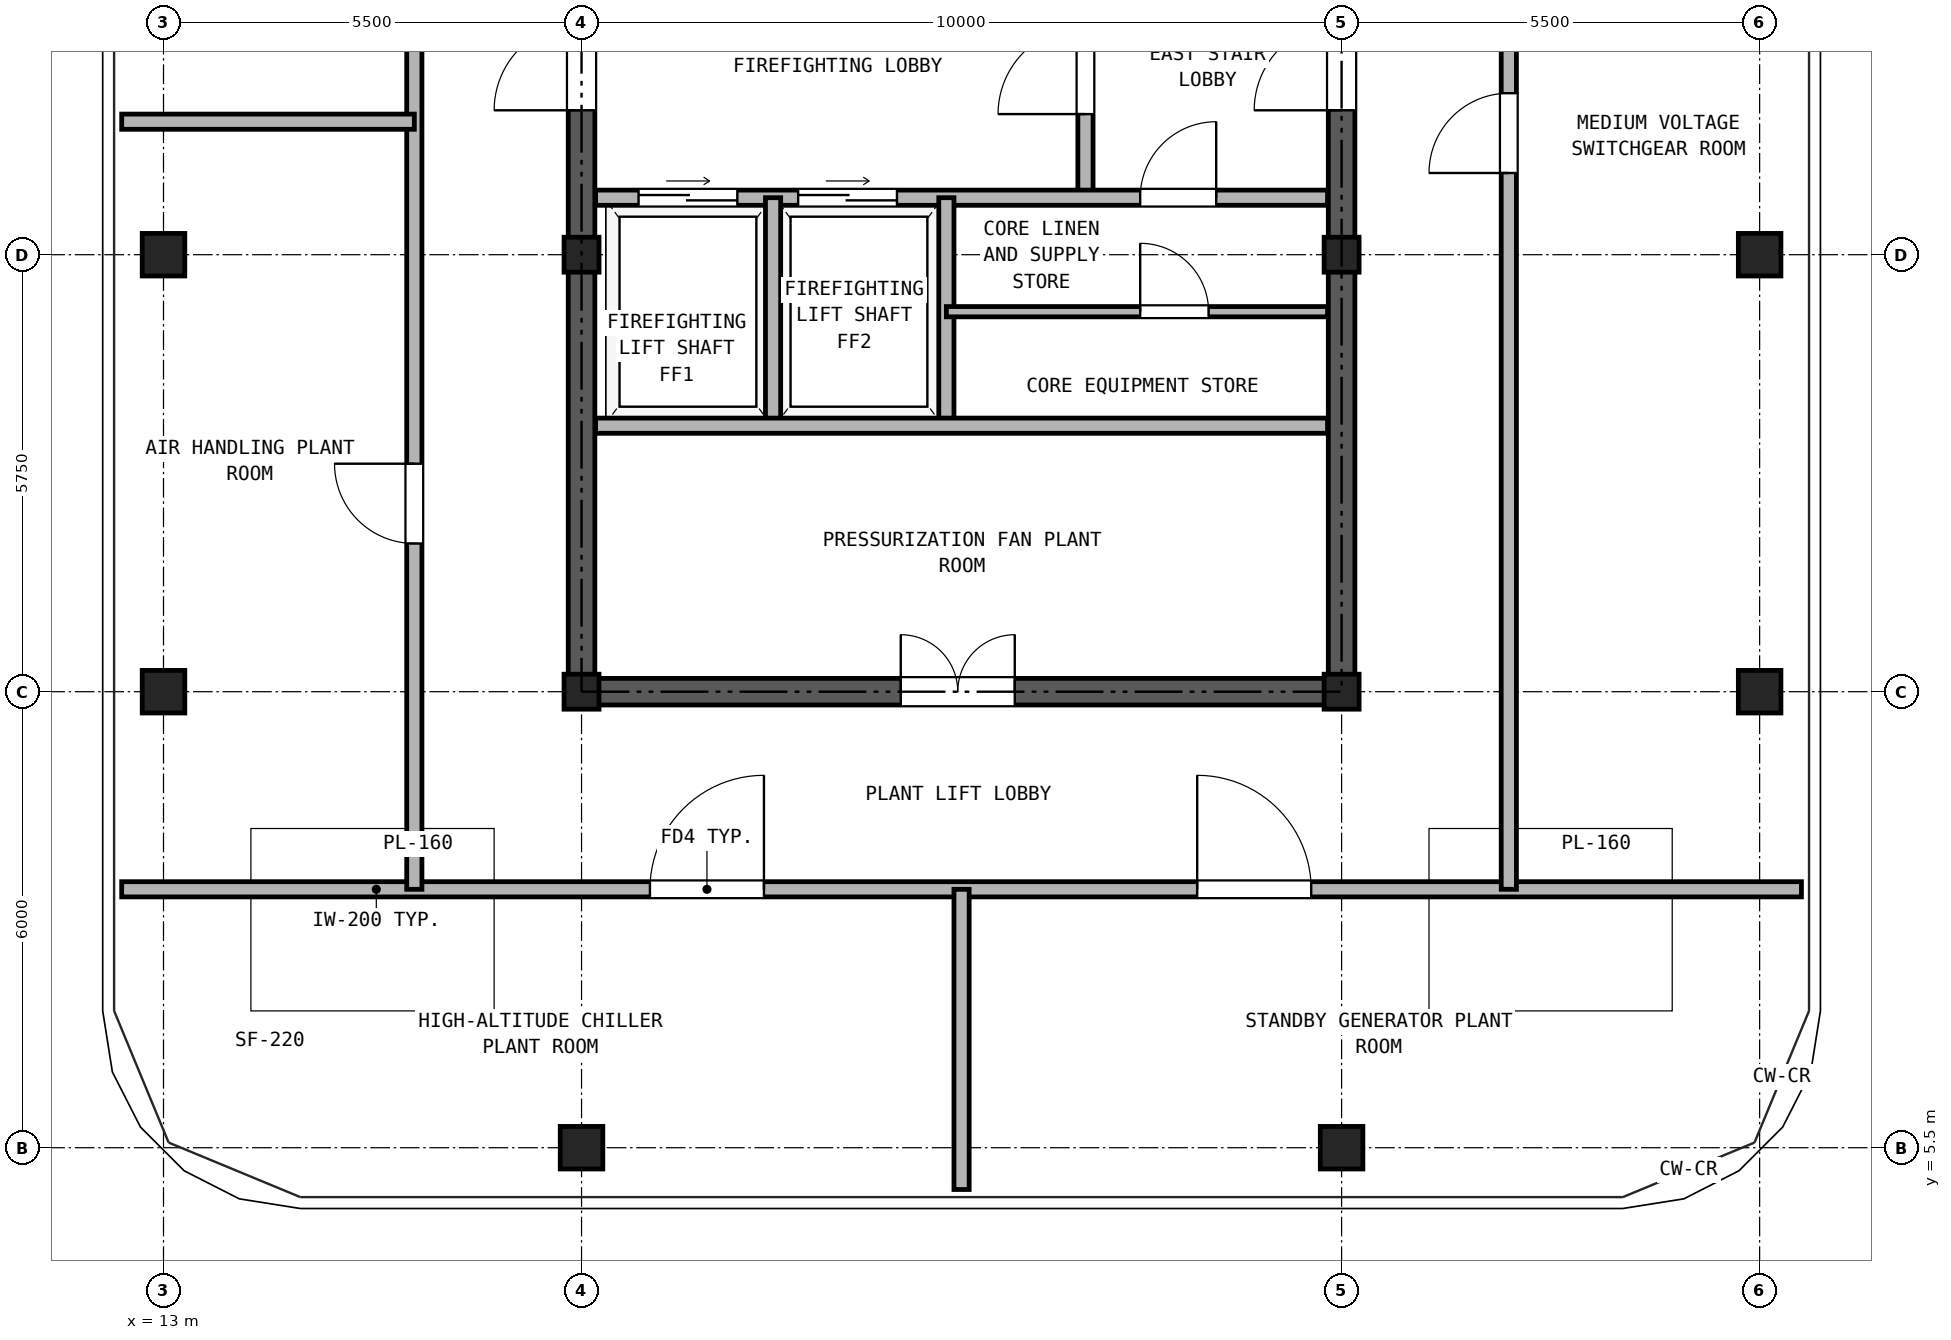
"""IFC4 building model, lengths in metres.
Left out: names, types, materials, properties, quantities, classifications, styles, units other than length and angle.
Written with IfcOpenShell. Run it as: python <this file> out.ifc"""

import sys

from ifc_helpers import new_model, si_unit, direction, frame, frame_2d, origin, origin_2d, place, context, subcontext, project, spatial, rectangle, hollow_rectangle, extrude, source, transform, mapped, element, fill, save


model = new_model("IFC4")
c1 = context("Model", 3, precision=1e-05, world=origin(), true_north=direction((0.0, 1.0)))
c2 = subcontext(c1, "Body", "Model", "MODEL_VIEW")
j1 = project(units=[si_unit("LENGTHUNIT", "METRE"), si_unit("PLANEANGLEUNIT", "RADIAN")], contexts=[c1])
p1 = place(None, origin())
s1 = spatial("IfcSite", under=j1, at=p1, CompositionType="ELEMENT")
p2 = place(p1, origin())
s2 = spatial("IfcBuilding", under=s1, at=p2, CompositionType="ELEMENT")
p3 = place(p2, frame((0.0, 0.0, 292.9)))
s3 = spatial("IfcBuildingStorey", under=s2, at=p3, CompositionType="ELEMENT", Elevation=292.9)
m1 = source(origin(), c2, "Body", "SweptSolid", [
    extrude(hollow_rectangle(XDim=0.56, YDim=0.56, WallThickness=0.03, at=origin_2d()), origin(), (0.0, 0.0, 1.0), 3.312),
])
for number, where, z_axis, x_axis in (
    (1, (18.5, 5.5, 0.0), (0.0, 0.0, 1.0), (1.0, 0.0, 0.0)),
    (2, (28.5, 5.5, 0.0), (0.0, 0.0, 1.0), (1.0, 0.0, 0.0)),
    (3, (13.0, 11.5, 0.0), (0.0, 0.0, 1.0), (1.0, 0.0, 0.0)),
    (4, (34.0, 11.5, 0.0), (0.0, 0.0, 1.0), (1.0, 0.0, 0.0)),
    (5, (13.0, 17.25, 0.0), (0.0, 0.0, 1.0), (1.0, 0.0, 0.0)),
    (6, (34.0, 17.25, 0.0), (0.0, 0.0, 1.0), (1.0, 0.0, 0.0)),
):
    element("IfcColumn", number, at=place(p3, frame(where, z_axis=z_axis, x_axis=x_axis)), inside=s3, PredefinedType="COLUMN", context=c2, shape_type="MappedRepresentation", body=[
        mapped(m1, transform((0.0, 0.0, 0.0), x_axis=(1.0, 0.0, 0.0), y_axis=(0.0, 1.0, 0.0), z_axis=(0.0, 0.0, 1.0), scale=1.0)),
    ])
m2 = source(origin(), c2, "Body", "SweptSolid", [
    extrude(hollow_rectangle(XDim=0.46, YDim=0.46, WallThickness=0.025, at=origin_2d()), origin(), (0.0, 0.0, 1.0), 3.312),
])
for number, where, z_axis, x_axis in (
    (7, (18.5, 11.5, 0.0), (0.0, 0.0, 1.0), (1.0, 0.0, 0.0)),
    (8, (18.5, 17.25, 0.0), (0.0, 0.0, 1.0), (1.0, 0.0, 0.0)),
    (9, (28.5, 11.5, 0.0), (0.0, 0.0, 1.0), (1.0, 0.0, 0.0)),
    (10, (28.5, 17.25, 0.0), (0.0, 0.0, 1.0), (1.0, 0.0, 0.0)),
):
    element("IfcColumn", number, at=place(p3, frame(where, z_axis=z_axis, x_axis=x_axis)), inside=s3, PredefinedType="COLUMN", context=c2, shape_type="MappedRepresentation", body=[
        mapped(m2, transform((0.0, 0.0, 0.0), x_axis=(1.0, 0.0, 0.0), y_axis=(0.0, 1.0, 0.0), z_axis=(0.0, 0.0, 1.0), scale=1.0)),
    ])
p4 = place(p3, frame((18.325, 11.5, 0.0), z_axis=(0.0, 0.0, 1.0), x_axis=(1.0, 0.0, 0.0)))
e11 = element("IfcWall", 11, at=p4, inside=s3, PredefinedType="SHEAR", context=c2, shape_type="SweptSolid", body=[
    extrude(rectangle(XDim=10.35, YDim=0.35, at=frame_2d((5.175, 0.0))), origin(), (0.0, 0.0, 1.0), 3.34),
])
p5 = place(p4, frame((4.375, 0.0, 0.0)))
e12 = element("IfcOpeningElement", 12, at=p5, cuts=e11, PredefinedType="OPENING", context=c2, shape_type="SweptSolid", body=[
    extrude(rectangle(XDim=1.5, YDim=2.25, at=frame_2d((0.75, 1.125))), frame((0.0, 0.185, 0.0), z_axis=(0.0, -1.0, 0.0), x_axis=(1.0, 0.0, 0.0)), (0.0, 0.0, 1.0), 0.37),
])
p6 = place(p3, frame((18.5, 11.675, 0.0), z_axis=(0.0, 0.0, 1.0), x_axis=(0.0, 1.0, 0.0)))
e13 = element("IfcWall", 13, at=p6, inside=s3, PredefinedType="SHEAR", context=c2, shape_type="SweptSolid", body=[
    extrude(rectangle(XDim=16.9, YDim=0.35, at=frame_2d((8.45, 0.0))), origin(), (0.0, 0.0, 1.0), 3.34),
])
p7 = place(p6, frame((7.475, 0.0, 0.0)))
e14 = element("IfcOpeningElement", 14, at=p7, cuts=e13, PredefinedType="OPENING", context=c2, shape_type="SweptSolid", body=[
    extrude(rectangle(XDim=1.15, YDim=2.2, at=frame_2d((0.575, 1.1))), frame((0.0, 0.185, 0.0), z_axis=(0.0, -1.0, 0.0), x_axis=(1.0, 0.0, 0.0)), (0.0, 0.0, 1.0), 0.37),
])
p8 = place(p3, frame((28.5, 11.675, 0.0), z_axis=(0.0, 0.0, 1.0), x_axis=(0.0, 1.0, 0.0)))
e15 = element("IfcWall", 15, at=p8, inside=s3, PredefinedType="SHEAR", context=c2, shape_type="SweptSolid", body=[
    extrude(rectangle(XDim=16.9, YDim=0.35, at=frame_2d((8.45, 0.0))), origin(), (0.0, 0.0, 1.0), 3.34),
])
p9 = place(p8, frame((7.475, 0.0, 0.0)))
e16 = element("IfcOpeningElement", 16, at=p9, cuts=e15, PredefinedType="OPENING", context=c2, shape_type="SweptSolid", body=[
    extrude(rectangle(XDim=1.15, YDim=2.2, at=frame_2d((0.575, 1.1))), frame((0.0, 0.185, 0.0), z_axis=(0.0, -1.0, 0.0), x_axis=(1.0, 0.0, 0.0)), (0.0, 0.0, 1.0), 0.37),
])
p10 = place(p3, frame((25.13, 18.0, 0.0), z_axis=(0.0, 0.0, 1.0), x_axis=(0.0, 1.0, 0.0)))
e17 = element("IfcWall", 17, at=p10, inside=s3, PredefinedType="PARTITIONING", context=c2, shape_type="SweptSolid", body=[
    extrude(rectangle(XDim=3.39, YDim=0.2, at=frame_2d((1.695, 0.0))), origin(), (0.0, 0.0, 1.0), 3.34),
])
p11 = place(p10, frame((1.1, 0.0, 0.0)))
e18 = element("IfcOpeningElement", 18, at=p11, cuts=e17, PredefinedType="OPENING", context=c2, shape_type="SweptSolid", body=[
    extrude(rectangle(XDim=1.15, YDim=2.2, at=frame_2d((0.575, 1.1))), frame((0.0, 0.11, 0.0), z_axis=(0.0, -1.0, 0.0), x_axis=(1.0, 0.0, 0.0)), (0.0, 0.0, 1.0), 0.22),
])
p12 = place(p3, frame((18.685, 18.0, 0.0), z_axis=(0.0, 0.0, 1.0), x_axis=(1.0, 0.0, 0.0)))
e19 = element("IfcWall", 19, at=p12, inside=s3, PredefinedType="PARTITIONING", context=c2, shape_type="SweptSolid", body=[
    extrude(rectangle(XDim=9.63, YDim=0.2, at=frame_2d((4.815, 0.0))), origin(), (0.0, 0.0, 1.0), 3.34),
])
p13 = place(p12, frame((0.565, 0.0, 0.0)))
e20 = element("IfcOpeningElement", 20, at=p13, cuts=e19, PredefinedType="OPENING", context=c2, shape_type="SweptSolid", body=[
    extrude(rectangle(XDim=1.3, YDim=2.3, at=frame_2d((0.65, 1.15))), frame((0.0, 0.11, 0.0), z_axis=(0.0, -1.0, 0.0), x_axis=(1.0, 0.0, 0.0)), (0.0, 0.0, 1.0), 0.22),
])
p14 = place(p12, frame((2.665, 0.0, 0.0)))
e21 = element("IfcOpeningElement", 21, at=p14, cuts=e19, PredefinedType="OPENING", context=c2, shape_type="SweptSolid", body=[
    extrude(rectangle(XDim=1.3, YDim=2.3, at=frame_2d((0.65, 1.15))), frame((0.0, 0.11, 0.0), z_axis=(0.0, -1.0, 0.0), x_axis=(1.0, 0.0, 0.0)), (0.0, 0.0, 1.0), 0.22),
])
p15 = place(p12, frame((7.165, 0.0, 0.0)))
e22 = element("IfcOpeningElement", 22, at=p15, cuts=e19, PredefinedType="OPENING", context=c2, shape_type="SweptSolid", body=[
    extrude(rectangle(XDim=1.0, YDim=2.15, at=frame_2d((0.5, 1.075))), frame((0.0, 0.11, 0.0), z_axis=(0.0, -1.0, 0.0), x_axis=(1.0, 0.0, 0.0)), (0.0, 0.0, 1.0), 0.22),
])
for number, where, z_axis, x_axis in (
    (23, (21.02, 15.0, 0.0), (0.0, 0.0, 1.0), (0.0, 1.0, 0.0)),
    (24, (23.3, 15.0, 0.0), (0.0, 0.0, 1.0), (0.0, 1.0, 0.0)),
):
    element("IfcWall", number, at=place(p3, frame(where, z_axis=z_axis, x_axis=x_axis)), inside=s3, PredefinedType="PARTITIONING", context=c2, shape_type="SweptSolid", body=[
        extrude(rectangle(XDim=3.0, YDim=0.2, at=frame_2d((1.5, 0.0))), origin(), (0.0, 0.0, 1.0), 3.34),
    ])
p16 = place(p3, frame((18.685, 15.0, 0.0), z_axis=(0.0, 0.0, 1.0), x_axis=(1.0, 0.0, 0.0)))
e25 = element("IfcWall", 25, at=p16, inside=s3, PredefinedType="PARTITIONING", context=c2, shape_type="SweptSolid", body=[
    extrude(rectangle(XDim=9.63, YDim=0.2, at=frame_2d((4.815, 0.0))), origin(), (0.0, 0.0, 1.0), 3.34),
])
p17 = place(p3, frame((23.3, 16.5, 0.0), z_axis=(0.0, 0.0, 1.0), x_axis=(1.0, 0.0, 0.0)))
e26 = element("IfcWall", 26, at=p17, inside=s3, PredefinedType="PARTITIONING", context=c2, shape_type="SweptSolid", body=[
    extrude(rectangle(XDim=5.015, YDim=0.135, at=frame_2d((2.507, 0.0))), origin(), (0.0, 0.0, 1.0), 3.34),
])
p18 = place(p17, frame((2.55, 0.0, 0.0)))
e27 = element("IfcOpeningElement", 27, at=p18, cuts=e26, PredefinedType="OPENING", context=c2, shape_type="SweptSolid", body=[
    extrude(rectangle(XDim=0.9, YDim=2.05, at=frame_2d((0.45, 1.025))), frame((0.0, 0.077, 0.0), z_axis=(0.0, -1.0, 0.0), x_axis=(1.0, 0.0, 0.0)), (0.0, 0.0, 1.0), 0.155),
])
p19 = place(p3, frame((12.45, 8.9, 0.0), z_axis=(0.0, 0.0, 1.0), x_axis=(1.0, 0.0, 0.0)))
e28 = element("IfcWall", 28, at=p19, inside=s3, PredefinedType="PARTITIONING", context=c2, shape_type="SweptSolid", body=[
    extrude(rectangle(XDim=22.1, YDim=0.2, at=frame_2d((11.05, 0.0))), origin(), (0.0, 0.0, 1.0), 3.34),
])
p20 = place(p19, frame((6.95, 0.0, 0.0)))
e29 = element("IfcOpeningElement", 29, at=p20, cuts=e28, PredefinedType="OPENING", context=c2, shape_type="SweptSolid", body=[
    extrude(rectangle(XDim=1.5, YDim=2.25, at=frame_2d((0.75, 1.125))), frame((0.0, 0.11, 0.0), z_axis=(0.0, -1.0, 0.0), x_axis=(1.0, 0.0, 0.0)), (0.0, 0.0, 1.0), 0.22),
])
p21 = place(p19, frame((14.15, 0.0, 0.0)))
e30 = element("IfcOpeningElement", 30, at=p21, cuts=e28, PredefinedType="OPENING", context=c2, shape_type="SweptSolid", body=[
    extrude(rectangle(XDim=1.5, YDim=2.25, at=frame_2d((0.75, 1.125))), frame((0.0, 0.11, 0.0), z_axis=(0.0, -1.0, 0.0), x_axis=(1.0, 0.0, 0.0)), (0.0, 0.0, 1.0), 0.22),
])
p22 = place(p3, frame((16.3, 8.9, 0.0), z_axis=(0.0, 0.0, 1.0), x_axis=(0.0, 1.0, 0.0)))
e31 = element("IfcWall", 31, at=p22, inside=s3, PredefinedType="PARTITIONING", context=c2, shape_type="SweptSolid", body=[
    extrude(rectangle(XDim=19.85, YDim=0.2, at=frame_2d((9.925, 0.0))), origin(), (0.0, 0.0, 1.0), 3.34),
])
p23 = place(p22, frame((4.55, 0.0, 0.0)))
e32 = element("IfcOpeningElement", 32, at=p23, cuts=e31, PredefinedType="OPENING", context=c2, shape_type="SweptSolid", body=[
    extrude(rectangle(XDim=1.05, YDim=2.15, at=frame_2d((0.525, 1.075))), frame((0.0, 0.11, 0.0), z_axis=(0.0, -1.0, 0.0), x_axis=(1.0, 0.0, 0.0)), (0.0, 0.0, 1.0), 0.22),
])
p24 = place(p22, frame((14.475, 0.0, 0.0)))
e33 = element("IfcOpeningElement", 33, at=p24, cuts=e31, PredefinedType="OPENING", context=c2, shape_type="SweptSolid", body=[
    extrude(rectangle(XDim=1.05, YDim=2.15, at=frame_2d((0.525, 1.075))), frame((0.0, 0.11, 0.0), z_axis=(0.0, -1.0, 0.0), x_axis=(1.0, 0.0, 0.0)), (0.0, 0.0, 1.0), 0.22),
])
p25 = place(p3, frame((30.7, 8.9, 0.0), z_axis=(0.0, 0.0, 1.0), x_axis=(0.0, 1.0, 0.0)))
e34 = element("IfcWall", 34, at=p25, inside=s3, PredefinedType="PARTITIONING", context=c2, shape_type="SweptSolid", body=[
    extrude(rectangle(XDim=19.85, YDim=0.2, at=frame_2d((9.925, 0.0))), origin(), (0.0, 0.0, 1.0), 3.34),
])
p26 = place(p25, frame((9.425, 0.0, 0.0)))
e35 = element("IfcOpeningElement", 35, at=p26, cuts=e34, PredefinedType="OPENING", context=c2, shape_type="SweptSolid", body=[
    extrude(rectangle(XDim=1.05, YDim=2.15, at=frame_2d((0.525, 1.075))), frame((0.0, 0.11, 0.0), z_axis=(0.0, -1.0, 0.0), x_axis=(1.0, 0.0, 0.0)), (0.0, 0.0, 1.0), 0.22),
])
p27 = place(p3, frame((23.5, 4.95, 0.0), z_axis=(0.0, 0.0, 1.0), x_axis=(0.0, 1.0, 0.0)))
e36 = element("IfcWall", 36, at=p27, inside=s3, PredefinedType="PARTITIONING", context=c2, shape_type="SweptSolid", body=[
    extrude(rectangle(XDim=3.95, YDim=0.2, at=frame_2d((1.975, 0.0))), origin(), (0.0, 0.0, 1.0), 3.34),
])
p28 = place(p3, frame((12.45, 19.0, 0.0), z_axis=(0.0, 0.0, 1.0), x_axis=(1.0, 0.0, 0.0)))
e37 = element("IfcWall", 37, at=p28, inside=s3, PredefinedType="PARTITIONING", context=c2, shape_type="SweptSolid", body=[
    extrude(rectangle(XDim=3.85, YDim=0.2, at=frame_2d((1.925, 0.0))), origin(), (0.0, 0.0, 1.0), 3.34),
])
p29 = place(p11, origin())
e38 = element("IfcDoor", 38, at=p29, inside=s3, OperationType="SINGLE_SWING_LEFT", PredefinedType="DOOR", context=c2, shape_type="SweptSolid", body=[
    extrude(rectangle(XDim=1.15, YDim=2.2, at=frame_2d((0.575, 1.1))), frame((0.0, 0.025, 0.0), z_axis=(0.0, -1.0, 0.0), x_axis=(1.0, 0.0, 0.0)), (0.0, 0.0, 1.0), 0.05),
])
fill(e18, e38)
p30 = place(p13, origin())
e39 = element("IfcDoor", 39, at=p30, inside=s3, OperationType="DOUBLE_DOOR_SLIDING", PredefinedType="DOOR", context=c2, shape_type="SweptSolid", body=[
    extrude(rectangle(XDim=1.3, YDim=2.3, at=frame_2d((0.65, 1.15))), frame((0.0, 0.025, 0.0), z_axis=(0.0, -1.0, 0.0), x_axis=(1.0, 0.0, 0.0)), (0.0, 0.0, 1.0), 0.05),
])
fill(e20, e39)
p31 = place(p14, origin())
e40 = element("IfcDoor", 40, at=p31, inside=s3, OperationType="DOUBLE_DOOR_SLIDING", PredefinedType="DOOR", context=c2, shape_type="SweptSolid", body=[
    extrude(rectangle(XDim=1.3, YDim=2.3, at=frame_2d((0.65, 1.15))), frame((0.0, 0.025, 0.0), z_axis=(0.0, -1.0, 0.0), x_axis=(1.0, 0.0, 0.0)), (0.0, 0.0, 1.0), 0.05),
])
fill(e21, e40)
p32 = place(p15, frame((1.0, 0.0, 0.0), z_axis=(0.0, 0.0, 1.0), x_axis=(-1.0, 0.0, 0.0)))
e41 = element("IfcDoor", 41, at=p32, inside=s3, OperationType="SINGLE_SWING_RIGHT", PredefinedType="DOOR", context=c2, shape_type="SweptSolid", body=[
    extrude(rectangle(XDim=1.0, YDim=2.15, at=frame_2d((0.5, 1.075))), frame((0.0, 0.025, 0.0), z_axis=(0.0, -1.0, 0.0), x_axis=(1.0, 0.0, 0.0)), (0.0, 0.0, 1.0), 0.05),
])
fill(e22, e41)
p33 = place(p18, frame((0.9, 0.0, 0.0), z_axis=(0.0, 0.0, 1.0), x_axis=(-1.0, 0.0, 0.0)))
e42 = element("IfcDoor", 42, at=p33, inside=s3, OperationType="SINGLE_SWING_LEFT", PredefinedType="DOOR", context=c2, shape_type="SweptSolid", body=[
    extrude(rectangle(XDim=0.9, YDim=2.05, at=frame_2d((0.45, 1.025))), frame((0.0, 0.025, 0.0), z_axis=(0.0, -1.0, 0.0), x_axis=(1.0, 0.0, 0.0)), (0.0, 0.0, 1.0), 0.05),
])
fill(e27, e42)
p34 = place(p7, frame((1.15, 0.0, 0.0), z_axis=(0.0, 0.0, 1.0), x_axis=(-1.0, 0.0, 0.0)))
e43 = element("IfcDoor", 43, at=p34, inside=s3, OperationType="SINGLE_SWING_LEFT", PredefinedType="DOOR", context=c2, shape_type="SweptSolid", body=[
    extrude(rectangle(XDim=1.15, YDim=2.2, at=frame_2d((0.575, 1.1))), frame((0.0, 0.025, 0.0), z_axis=(0.0, -1.0, 0.0), x_axis=(1.0, 0.0, 0.0)), (0.0, 0.0, 1.0), 0.05),
])
fill(e14, e43)
p35 = place(p9, origin())
e44 = element("IfcDoor", 44, at=p35, inside=s3, OperationType="SINGLE_SWING_LEFT", PredefinedType="DOOR", context=c2, shape_type="SweptSolid", body=[
    extrude(rectangle(XDim=1.15, YDim=2.2, at=frame_2d((0.575, 1.1))), frame((0.0, 0.025, 0.0), z_axis=(0.0, -1.0, 0.0), x_axis=(1.0, 0.0, 0.0)), (0.0, 0.0, 1.0), 0.05),
])
fill(e16, e44)
p36 = place(p5, frame((1.5, 0.0, 0.0), z_axis=(0.0, 0.0, 1.0), x_axis=(-1.0, 0.0, 0.0)))
e45 = element("IfcDoor", 45, at=p36, inside=s3, OperationType="DOUBLE_DOOR_SINGLE_SWING", PredefinedType="DOOR", context=c2, shape_type="SweptSolid", body=[
    extrude(rectangle(XDim=1.5, YDim=2.25, at=frame_2d((0.75, 1.125))), frame((0.0, 0.025, 0.0), z_axis=(0.0, -1.0, 0.0), x_axis=(1.0, 0.0, 0.0)), (0.0, 0.0, 1.0), 0.05),
])
fill(e12, e45)
p37 = place(p20, frame((1.5, 0.0, 0.0), z_axis=(0.0, 0.0, 1.0), x_axis=(-1.0, 0.0, 0.0)))
e46 = element("IfcDoor", 46, at=p37, inside=s3, OperationType="SINGLE_SWING_RIGHT", PredefinedType="DOOR", context=c2, shape_type="SweptSolid", body=[
    extrude(rectangle(XDim=1.5, YDim=2.25, at=frame_2d((0.75, 1.125))), frame((0.0, 0.025, 0.0), z_axis=(0.0, -1.0, 0.0), x_axis=(1.0, 0.0, 0.0)), (0.0, 0.0, 1.0), 0.05),
])
fill(e29, e46)
p38 = place(p21, frame((1.5, 0.0, 0.0), z_axis=(0.0, 0.0, 1.0), x_axis=(-1.0, 0.0, 0.0)))
e47 = element("IfcDoor", 47, at=p38, inside=s3, OperationType="SINGLE_SWING_LEFT", PredefinedType="DOOR", context=c2, shape_type="SweptSolid", body=[
    extrude(rectangle(XDim=1.5, YDim=2.25, at=frame_2d((0.75, 1.125))), frame((0.0, 0.025, 0.0), z_axis=(0.0, -1.0, 0.0), x_axis=(1.0, 0.0, 0.0)), (0.0, 0.0, 1.0), 0.05),
])
fill(e30, e47)
p39 = place(p23, frame((1.05, 0.0, 0.0), z_axis=(0.0, 0.0, 1.0), x_axis=(-1.0, 0.0, 0.0)))
e48 = element("IfcDoor", 48, at=p39, inside=s3, OperationType="SINGLE_SWING_RIGHT", PredefinedType="DOOR", context=c2, shape_type="SweptSolid", body=[
    extrude(rectangle(XDim=1.05, YDim=2.15, at=frame_2d((0.525, 1.075))), frame((0.0, 0.025, 0.0), z_axis=(0.0, -1.0, 0.0), x_axis=(1.0, 0.0, 0.0)), (0.0, 0.0, 1.0), 0.05),
])
fill(e32, e48)
p40 = place(p26, origin())
e49 = element("IfcDoor", 49, at=p40, inside=s3, OperationType="SINGLE_SWING_LEFT", PredefinedType="DOOR", context=c2, shape_type="SweptSolid", body=[
    extrude(rectangle(XDim=1.05, YDim=2.15, at=frame_2d((0.525, 1.075))), frame((0.0, 0.025, 0.0), z_axis=(0.0, -1.0, 0.0), x_axis=(1.0, 0.0, 0.0)), (0.0, 0.0, 1.0), 0.05),
])
fill(e35, e49)
save(model, sys.argv[1])
